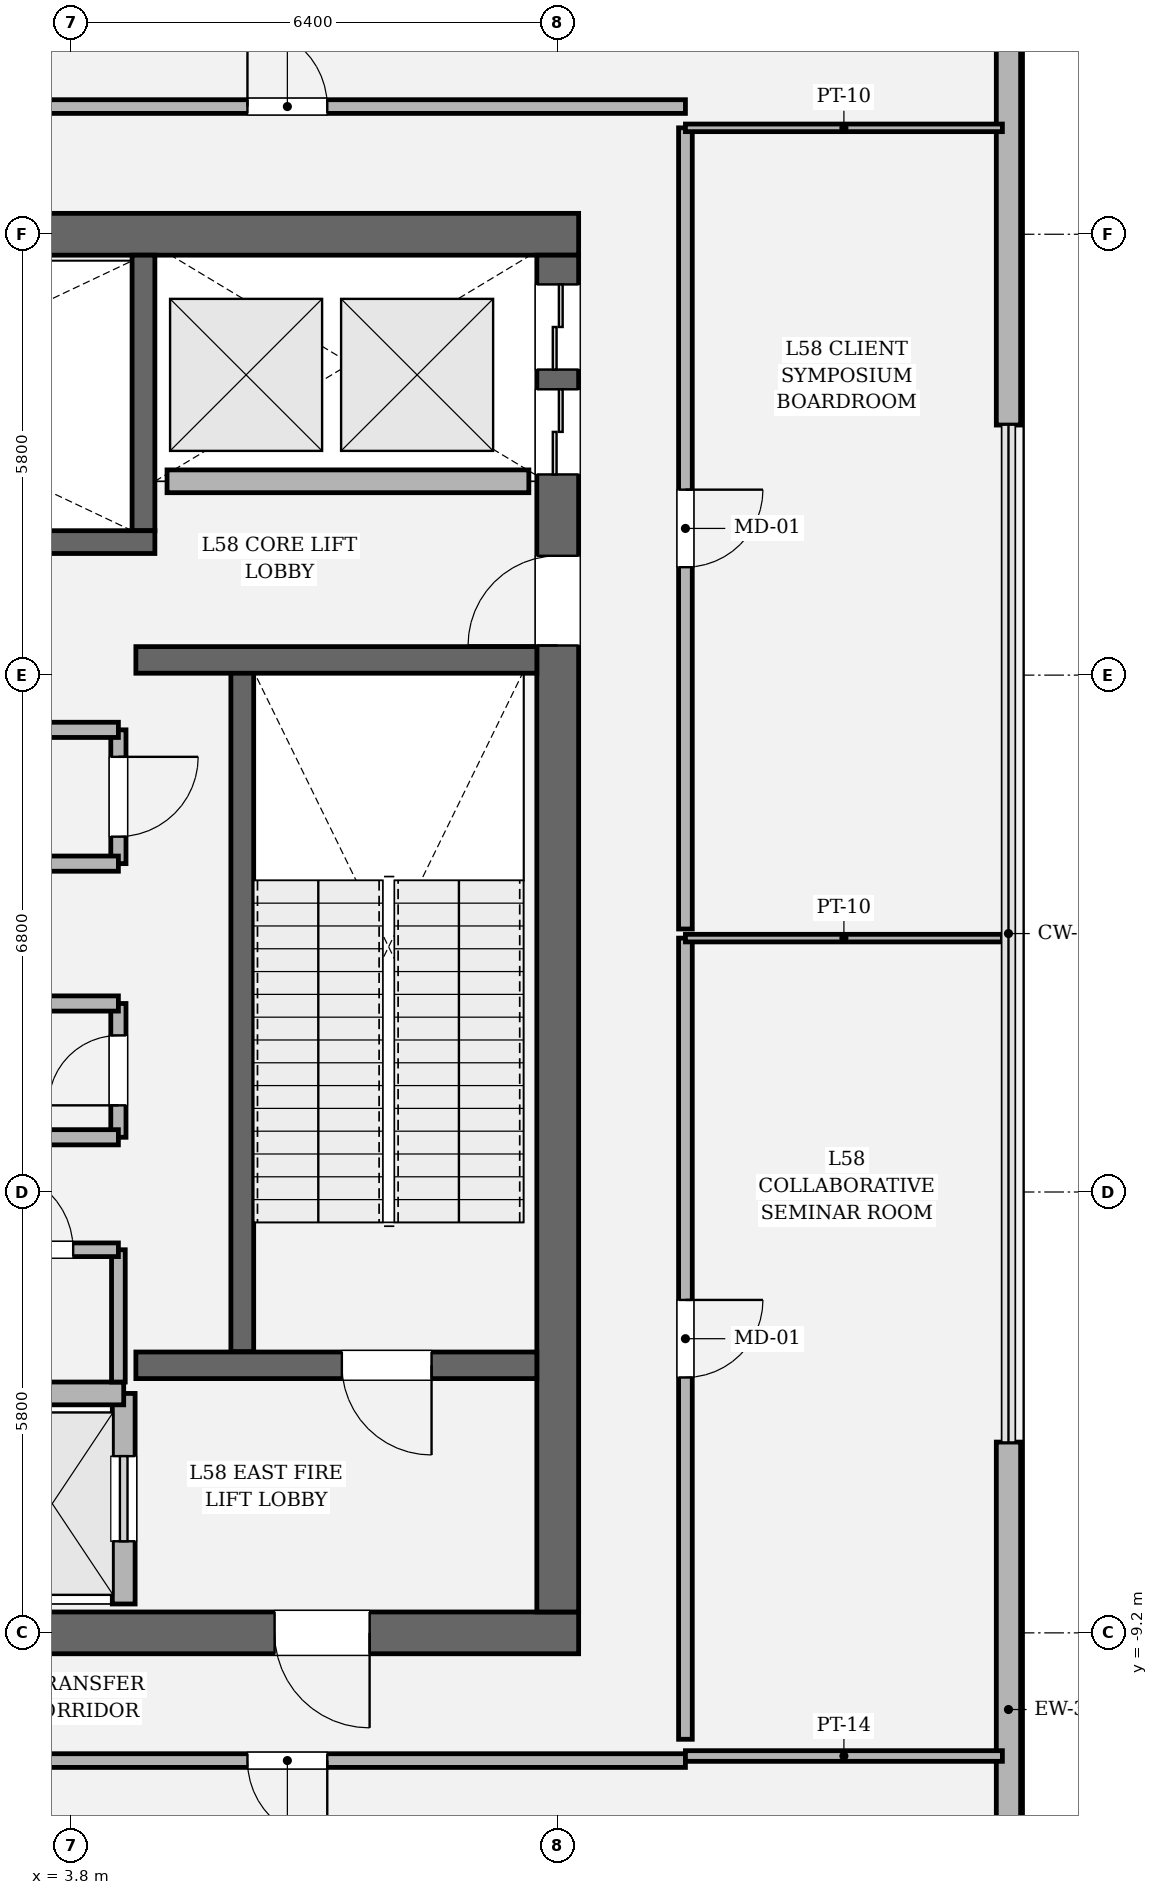
"""IFC4 building model, lengths in metres.
Left out: names, types, materials, properties, quantities, classifications, styles, units other than length and angle.
Written with IfcOpenShell. Run it as: python <this file> out.ifc"""

import sys

from ifc_helpers import new_model, si_unit, direction, frame, frame_2d, origin, place, context, subcontext, project, spatial, rectangle, extrude, element, fill, save


model = new_model("IFC4")
c1 = context("Model", 3, precision=1e-05, world=origin(), true_north=direction((0.0, 1.0)))
c2 = subcontext(c1, "Body", "Model", "MODEL_VIEW")
j1 = project(units=[si_unit("LENGTHUNIT", "METRE"), si_unit("PLANEANGLEUNIT", "RADIAN")], contexts=[c1])
p1 = place(None, origin())
s1 = spatial("IfcSite", under=j1, at=p1, CompositionType="ELEMENT")
p2 = place(p1, origin())
s2 = spatial("IfcBuilding", under=s1, at=p2, CompositionType="ELEMENT")
p3 = place(p2, frame((0.0, 0.0, 246.6)))
s3 = spatial("IfcBuildingStorey", under=s2, at=p3, CompositionType="ELEMENT", Elevation=246.6)
p4 = place(p3, frame((10.475, -9.2, 0.0), z_axis=(0.0, 0.0, 1.0), x_axis=(-1.0, 0.0, 0.0)))
e1 = element("IfcWall", 1, at=p4, inside=s3, PredefinedType="SHEAR", context=c2, shape_type="SweptSolid", body=[
    extrude(rectangle(XDim=20.95, YDim=0.55, at=frame_2d((10.475, 0.0))), origin(), (0.0, 0.0, 1.0), 4.8),
])
p5 = place(p4, frame((2.75, 0.0, 0.0)))
e2 = element("IfcOpeningElement", 2, at=p5, cuts=e1, PredefinedType="OPENING", context=c2, shape_type="SweptSolid", body=[
    extrude(rectangle(XDim=1.25, YDim=2.25, at=frame_2d((0.625, 1.125))), frame((0.0, 0.285, 0.0), z_axis=(0.0, -1.0, 0.0), x_axis=(1.0, 0.0, 0.0)), (0.0, 0.0, 1.0), 0.57),
])
p6 = place(p4, frame((16.95, 0.0, 0.0)))
e3 = element("IfcOpeningElement", 3, at=p6, cuts=e1, PredefinedType="OPENING", context=c2, shape_type="SweptSolid", body=[
    extrude(rectangle(XDim=1.25, YDim=2.25, at=frame_2d((0.625, 1.125))), frame((0.0, 0.285, 0.0), z_axis=(0.0, -1.0, 0.0), x_axis=(1.0, 0.0, 0.0)), (0.0, 0.0, 1.0), 0.57),
])
p7 = place(p3, frame((-10.475, 9.2, 0.0), z_axis=(0.0, 0.0, 1.0), x_axis=(1.0, 0.0, 0.0)))
e4 = element("IfcWall", 4, at=p7, inside=s3, PredefinedType="SHEAR", context=c2, shape_type="SweptSolid", body=[
    extrude(rectangle(XDim=20.95, YDim=0.55, at=frame_2d((10.475, 0.0))), origin(), (0.0, 0.0, 1.0), 4.8),
])
p8 = place(p3, frame((10.2, 8.925, 0.0), z_axis=(0.0, 0.0, 1.0), x_axis=(0.0, -1.0, 0.0)))
e5 = element("IfcWall", 5, at=p8, inside=s3, PredefinedType="SHEAR", context=c2, shape_type="SweptSolid", body=[
    extrude(rectangle(XDim=17.85, YDim=0.55, at=frame_2d((8.925, 0.0))), origin(), (0.0, 0.0, 1.0), 4.8),
])
p9 = place(p8, frame((3.955, 0.0, 0.0)))
e6 = element("IfcOpeningElement", 6, at=p9, cuts=e5, PredefinedType="OPENING", context=c2, shape_type="SweptSolid", body=[
    extrude(rectangle(XDim=1.18, YDim=2.2, at=frame_2d((0.59, 1.1))), frame((0.0, 0.285, 0.0), z_axis=(0.0, -1.0, 0.0), x_axis=(1.0, 0.0, 0.0)), (0.0, 0.0, 1.0), 0.57),
])
p10 = place(p8, frame((1.765, 0.0, 0.0)))
e7 = element("IfcOpeningElement", 7, at=p10, cuts=e5, PredefinedType="OPENING", context=c2, shape_type="SweptSolid", body=[
    extrude(rectangle(XDim=1.12, YDim=2.25, at=frame_2d((0.56, 1.125))), frame((0.0, 0.285, 0.0), z_axis=(0.0, -1.0, 0.0), x_axis=(1.0, 0.0, 0.0)), (0.0, 0.0, 1.0), 0.57),
])
p11 = place(p8, frame((0.385, 0.0, 0.0)))
e8 = element("IfcOpeningElement", 8, at=p11, cuts=e5, PredefinedType="OPENING", context=c2, shape_type="SweptSolid", body=[
    extrude(rectangle(XDim=1.12, YDim=2.25, at=frame_2d((0.56, 1.125))), frame((0.0, 0.285, 0.0), z_axis=(0.0, -1.0, 0.0), x_axis=(1.0, 0.0, 0.0)), (0.0, 0.0, 1.0), 0.57),
])
p12 = place(p3, frame((6.05, 3.45, 0.0), z_axis=(0.0, 0.0, 1.0), x_axis=(0.0, -1.0, 0.0)))
e9 = element("IfcWall", 9, at=p12, inside=s3, PredefinedType="SOLIDWALL", context=c2, shape_type="SweptSolid", body=[
    extrude(rectangle(XDim=8.95, YDim=0.3, at=frame_2d((4.475, 0.0))), origin(), (0.0, 0.0, 1.0), 4.8),
])
p13 = place(p3, frame((4.75, 8.925, 0.0), z_axis=(0.0, 0.0, 1.0), x_axis=(0.0, -1.0, 0.0)))
e10 = element("IfcWall", 10, at=p13, inside=s3, PredefinedType="SOLIDWALL", context=c2, shape_type="SweptSolid", body=[
    extrude(rectangle(XDim=3.625, YDim=0.3, at=frame_2d((1.812, 0.0))), origin(), (0.0, 0.0, 1.0), 4.8),
])
p14 = place(p3, frame((-4.9, 5.15, 0.0), z_axis=(0.0, 0.0, 1.0), x_axis=(1.0, 0.0, 0.0)))
e11 = element("IfcWall", 11, at=p14, inside=s3, PredefinedType="SOLIDWALL", context=c2, shape_type="SweptSolid", body=[
    extrude(rectangle(XDim=9.8, YDim=0.3, at=frame_2d((4.9, 0.0))), origin(), (0.0, 0.0, 1.0), 4.8),
])
p15 = place(p14, frame((0.56, 0.0, 0.0)))
e12 = element("IfcOpeningElement", 12, at=p15, cuts=e11, PredefinedType="OPENING", context=c2, shape_type="SweptSolid", body=[
    extrude(rectangle(XDim=1.18, YDim=2.2, at=frame_2d((0.59, 1.1))), frame((0.0, 0.16, 0.0), z_axis=(0.0, -1.0, 0.0), x_axis=(1.0, 0.0, 0.0)), (0.0, 0.0, 1.0), 0.32),
])
p16 = place(p3, frame((4.65, -5.68, 0.0), z_axis=(0.0, 0.0, 1.0), x_axis=(1.0, 0.0, 0.0)))
e13 = element("IfcWall", 13, at=p16, inside=s3, PredefinedType="SOLIDWALL", context=c2, shape_type="SweptSolid", body=[
    extrude(rectangle(XDim=5.275, YDim=0.35, at=frame_2d((2.638, 0.0))), origin(), (0.0, 0.0, 1.0), 4.8),
])
p17 = place(p16, frame((2.71, 0.0, 0.0)))
e14 = element("IfcOpeningElement", 14, at=p17, cuts=e13, PredefinedType="OPENING", context=c2, shape_type="SweptSolid", body=[
    extrude(rectangle(XDim=1.18, YDim=2.2, at=frame_2d((0.59, 1.1))), frame((0.0, 0.185, 0.0), z_axis=(0.0, -1.0, 0.0), x_axis=(1.0, 0.0, 0.0)), (0.0, 0.0, 1.0), 0.37),
])
p18 = place(p3, frame((4.65, 3.6, 0.0), z_axis=(0.0, 0.0, 1.0), x_axis=(1.0, 0.0, 0.0)))
e15 = element("IfcWall", 15, at=p18, inside=s3, PredefinedType="SOLIDWALL", context=c2, shape_type="SweptSolid", body=[
    extrude(rectangle(XDim=5.275, YDim=0.35, at=frame_2d((2.638, 0.0))), origin(), (0.0, 0.0, 1.0), 4.8),
])
for number, where, z_axis, x_axis in (
    (16, (16.13, -13.727, 0.0), (0.0, 0.0, 1.0), (0.0, 1.0, 0.0)),
    (17, (16.13, 6.69, 0.0), (0.0, 0.0, 1.0), (0.0, 1.0, 0.0)),
):
    element("IfcWall", number, at=place(p3, frame(where, z_axis=z_axis, x_axis=x_axis)), inside=s3, PredefinedType="SOLIDWALL", context=c2, shape_type="SweptSolid", body=[
        extrude(rectangle(XDim=7.037, YDim=0.32, at=frame_2d((3.519, 0.0))), origin(), (0.0, 0.0, 1.0), 3.194),
    ])
p19 = place(p3, frame((4.49, -8.82, 0.0), z_axis=(0.0, 0.0, 1.0), x_axis=(0.0, 1.0, 0.0)))
e18 = element("IfcWall", 18, at=p19, inside=s3, PredefinedType="SOLIDWALL", context=c2, shape_type="SweptSolid", body=[
    extrude(rectangle(XDim=2.77, YDim=0.3, at=frame_2d((1.385, 0.0))), origin(), (0.0, 0.0, 1.0), 4.52),
])
p20 = place(p19, frame((0.825, 0.0, 0.0)))
e19 = element("IfcOpeningElement", 19, at=p20, cuts=e18, PredefinedType="OPENING", context=c2, shape_type="SweptSolid", body=[
    extrude(rectangle(XDim=1.12, YDim=2.25, at=frame_2d((0.56, 1.125))), frame((0.0, 0.16, 0.0), z_axis=(0.0, -1.0, 0.0), x_axis=(1.0, 0.0, 0.0)), (0.0, 0.0, 1.0), 0.32),
])
p21 = place(p3, frame((2.61, -6.05, 0.0), z_axis=(0.0, 0.0, 1.0), x_axis=(1.0, 0.0, 0.0)))
e20 = element("IfcWall", 20, at=p21, inside=s3, PredefinedType="SOLIDWALL", context=c2, shape_type="SweptSolid", body=[
    extrude(rectangle(XDim=1.88, YDim=0.3, at=frame_2d((0.94, 0.0))), origin(), (0.0, 0.0, 1.0), 4.52),
])
p22 = place(p3, frame((5.06, 5.95, 0.0), z_axis=(0.0, 0.0, 1.0), x_axis=(1.0, 0.0, 0.0)))
e21 = element("IfcWall", 21, at=p22, inside=s3, PredefinedType="SOLIDWALL", context=c2, shape_type="SweptSolid", body=[
    extrude(rectangle(XDim=4.76, YDim=0.3, at=frame_2d((2.38, 0.0))), origin(), (0.0, 0.0, 1.0), 4.52),
])
p23 = place(p3, frame((4.42, -5.9, 0.0), z_axis=(0.0, 0.0, 1.0), x_axis=(0.0, 1.0, 0.0)))
e22 = element("IfcWall", 22, at=p23, inside=s3, PredefinedType="PARTITIONING", context=c2, shape_type="SweptSolid", body=[
    extrude(rectangle(XDim=1.74, YDim=0.18, at=frame_2d((0.87, 0.0))), origin(), (0.0, 0.0, 1.0), 4.52),
])
p24 = place(p3, frame((4.42, -4.16, 0.0), z_axis=(0.0, 0.0, 1.0), x_axis=(-1.0, 0.0, 0.0)))
e23 = element("IfcWall", 23, at=p24, inside=s3, PredefinedType="PARTITIONING", context=c2, shape_type="SweptSolid", body=[
    extrude(rectangle(XDim=2.24, YDim=0.18, at=frame_2d((1.12, 0.0))), origin(), (0.0, 0.0, 1.0), 4.52),
])
p25 = place(p24, frame((0.595, 0.0, 0.0)))
e24 = element("IfcOpeningElement", 24, at=p25, cuts=e23, PredefinedType="OPENING", context=c2, shape_type="SweptSolid", body=[
    extrude(rectangle(XDim=1.05, YDim=2.2, at=frame_2d((0.525, 1.1))), frame((0.0, 0.1, 0.0), z_axis=(0.0, -1.0, 0.0), x_axis=(1.0, 0.0, 0.0)), (0.0, 0.0, 1.0), 0.2),
])
p26 = place(p3, frame((4.42, -2.68, 0.0), z_axis=(0.0, 0.0, 1.0), x_axis=(0.0, 1.0, 0.0)))
e25 = element("IfcWall", 25, at=p26, inside=s3, PredefinedType="SOLIDWALL", context=c2, shape_type="SweptSolid", body=[
    extrude(rectangle(XDim=1.76, YDim=0.2, at=frame_2d((0.88, 0.0))), origin(), (0.0, 0.0, 1.0), 4.52),
])
p27 = place(p26, frame((0.42, 0.0, 0.0)))
e26 = element("IfcOpeningElement", 26, at=p27, cuts=e25, PredefinedType="OPENING", context=c2, shape_type="SweptSolid", body=[
    extrude(rectangle(XDim=0.92, YDim=2.1, at=frame_2d((0.46, 1.05))), frame((0.0, 0.11, 0.0), z_axis=(0.0, -1.0, 0.0), x_axis=(1.0, 0.0, 0.0)), (0.0, 0.0, 1.0), 0.22),
])
for number, where, z_axis, x_axis in (
    (27, (4.42, -0.92, 0.0), (0.0, 0.0, 1.0), (-1.0, 0.0, 0.0)),
    (28, (2.48, -2.68, 0.0), (0.0, 0.0, 1.0), (1.0, 0.0, 0.0)),
):
    element("IfcWall", number, at=place(p3, frame(where, z_axis=z_axis, x_axis=x_axis)), inside=s3, PredefinedType="SOLIDWALL", context=c2, shape_type="SweptSolid", body=[
        extrude(rectangle(XDim=1.94, YDim=0.2, at=frame_2d((0.97, 0.0))), origin(), (0.0, 0.0, 1.0), 4.52),
    ])
p28 = place(p3, frame((4.42, 0.92, 0.0), z_axis=(0.0, 0.0, 1.0), x_axis=(0.0, 1.0, 0.0)))
e29 = element("IfcWall", 29, at=p28, inside=s3, PredefinedType="SOLIDWALL", context=c2, shape_type="SweptSolid", body=[
    extrude(rectangle(XDim=1.76, YDim=0.2, at=frame_2d((0.88, 0.0))), origin(), (0.0, 0.0, 1.0), 4.52),
])
p29 = place(p28, frame((0.355, 0.0, 0.0)))
e30 = element("IfcOpeningElement", 30, at=p29, cuts=e29, PredefinedType="OPENING", context=c2, shape_type="SweptSolid", body=[
    extrude(rectangle(XDim=1.05, YDim=2.2, at=frame_2d((0.525, 1.1))), frame((0.0, 0.11, 0.0), z_axis=(0.0, -1.0, 0.0), x_axis=(1.0, 0.0, 0.0)), (0.0, 0.0, 1.0), 0.22),
])
for number, where, z_axis, x_axis in (
    (31, (4.42, 2.68, 0.0), (0.0, 0.0, 1.0), (-1.0, 0.0, 0.0)),
    (32, (2.5, 0.92, 0.0), (0.0, 0.0, 1.0), (1.0, 0.0, 0.0)),
):
    element("IfcWall", number, at=place(p3, frame(where, z_axis=z_axis, x_axis=x_axis)), inside=s3, PredefinedType="SOLIDWALL", context=c2, shape_type="SweptSolid", body=[
        extrude(rectangle(XDim=1.92, YDim=0.2, at=frame_2d((0.96, 0.0))), origin(), (0.0, 0.0, 1.0), 4.52),
    ])
p30 = place(p3, frame((1.406, -10.88, 0.0), z_axis=(0.0, 0.0, 1.0), x_axis=(1.0, 0.0, 0.0)))
e33 = element("IfcWall", 33, at=p30, inside=s3, PredefinedType="PARTITIONING", context=c2, shape_type="SweptSolid", body=[
    extrude(rectangle(XDim=10.474, YDim=0.18, at=frame_2d((5.237, 0.0))), origin(), (0.0, 0.0, 1.0), 3.194),
])
p31 = place(p30, frame((4.712, 0.0, 0.0)))
e34 = element("IfcOpeningElement", 34, at=p31, cuts=e33, PredefinedType="OPENING", context=c2, shape_type="SweptSolid", body=[
    extrude(rectangle(XDim=1.05, YDim=2.2, at=frame_2d((0.525, 1.1))), frame((0.0, 0.1, 0.0), z_axis=(0.0, -1.0, 0.0), x_axis=(1.0, 0.0, 0.0)), (0.0, 0.0, 1.0), 0.2),
])
p32 = place(p3, frame((11.88, -10.82, 0.0), z_axis=(0.0, 0.0, 1.0), x_axis=(1.0, 0.0, 0.0)))
e35 = element("IfcWall", 35, at=p32, inside=s3, PredefinedType="PARTITIONING", context=c2, shape_type="SweptSolid", body=[
    extrude(rectangle(XDim=4.17, YDim=0.14, at=frame_2d((2.085, 0.0))), origin(), (0.0, 0.0, 1.0), 4.154),
])
p33 = place(p3, frame((11.88, -10.6, 0.0), z_axis=(0.0, 0.0, 1.0), x_axis=(0.0, 1.0, 0.0)))
e36 = element("IfcWall", 36, at=p33, inside=s3, PredefinedType="PARTITIONING", context=c2, shape_type="SweptSolid", body=[
    extrude(rectangle(XDim=10.54, YDim=0.18, at=frame_2d((5.27, 0.0))), origin(), (0.0, 0.0, 1.0), 3.194),
])
p34 = place(p33, frame((4.76, 0.0, 0.0)))
e37 = element("IfcOpeningElement", 37, at=p34, cuts=e36, PredefinedType="OPENING", context=c2, shape_type="SweptSolid", body=[
    extrude(rectangle(XDim=1.02, YDim=2.2, at=frame_2d((0.51, 1.1))), frame((0.0, 0.1, 0.0), z_axis=(0.0, -1.0, 0.0), x_axis=(1.0, 0.0, 0.0)), (0.0, 0.0, 1.0), 0.2),
])
p35 = place(p3, frame((11.88, -0.06, 0.0), z_axis=(0.0, 0.0, 1.0), x_axis=(1.0, 0.0, 0.0)))
e38 = element("IfcWall", 38, at=p35, inside=s3, PredefinedType="PARTITIONING", context=c2, shape_type="SweptSolid", body=[
    extrude(rectangle(XDim=4.17, YDim=0.1, at=frame_2d((2.085, 0.0))), origin(), (0.0, 0.0, 1.0), 4.52),
])
p36 = place(p3, frame((11.88, 0.06, 0.0), z_axis=(0.0, 0.0, 1.0), x_axis=(0.0, 1.0, 0.0)))
e39 = element("IfcWall", 39, at=p36, inside=s3, PredefinedType="PARTITIONING", context=c2, shape_type="SweptSolid", body=[
    extrude(rectangle(XDim=10.54, YDim=0.18, at=frame_2d((5.27, 0.0))), origin(), (0.0, 0.0, 1.0), 3.194),
])
p37 = place(p36, frame((4.76, 0.0, 0.0)))
e40 = element("IfcOpeningElement", 40, at=p37, cuts=e39, PredefinedType="OPENING", context=c2, shape_type="SweptSolid", body=[
    extrude(rectangle(XDim=1.02, YDim=2.2, at=frame_2d((0.51, 1.1))), frame((0.0, 0.1, 0.0), z_axis=(0.0, -1.0, 0.0), x_axis=(1.0, 0.0, 0.0)), (0.0, 0.0, 1.0), 0.2),
])
p38 = place(p3, frame((11.88, 10.6, 0.0), z_axis=(0.0, 0.0, 1.0), x_axis=(1.0, 0.0, 0.0)))
e41 = element("IfcWall", 41, at=p38, inside=s3, PredefinedType="PARTITIONING", context=c2, shape_type="SweptSolid", body=[
    extrude(rectangle(XDim=4.17, YDim=0.1, at=frame_2d((2.085, 0.0))), origin(), (0.0, 0.0, 1.0), 4.154),
])
p39 = place(p3, frame((11.88, 10.88, 0.0), z_axis=(0.0, 0.0, 1.0), x_axis=(-1.0, 0.0, 0.0)))
e42 = element("IfcWall", 42, at=p39, inside=s3, PredefinedType="PARTITIONING", context=c2, shape_type="SweptSolid", body=[
    extrude(rectangle(XDim=10.474, YDim=0.18, at=frame_2d((5.237, 0.0))), origin(), (0.0, 0.0, 1.0), 3.194),
])
p40 = place(p39, frame((4.712, 0.0, 0.0)))
e43 = element("IfcOpeningElement", 43, at=p40, cuts=e42, PredefinedType="OPENING", context=c2, shape_type="SweptSolid", body=[
    extrude(rectangle(XDim=1.05, YDim=2.2, at=frame_2d((0.525, 1.1))), frame((0.0, 0.1, 0.0), z_axis=(0.0, -1.0, 0.0), x_axis=(1.0, 0.0, 0.0)), (0.0, 0.0, 1.0), 0.2),
])
p41 = place(p17, origin())
e44 = element("IfcDoor", 44, at=p41, inside=s3, OperationType="SINGLE_SWING_RIGHT", PredefinedType="DOOR", context=c2, shape_type="SweptSolid", body=[
    extrude(rectangle(XDim=1.18, YDim=2.2, at=frame_2d((0.59, 1.1))), frame((0.0, 0.025, 0.0), z_axis=(0.0, -1.0, 0.0), x_axis=(1.0, 0.0, 0.0)), (0.0, 0.0, 1.0), 0.05),
])
fill(e14, e44)
p42 = place(p5, origin())
e45 = element("IfcDoor", 45, at=p42, inside=s3, OperationType="SINGLE_SWING_LEFT", PredefinedType="DOOR", context=c2, shape_type="SweptSolid", body=[
    extrude(rectangle(XDim=1.25, YDim=2.25, at=frame_2d((0.625, 1.125))), frame((0.0, 0.025, 0.0), z_axis=(0.0, -1.0, 0.0), x_axis=(1.0, 0.0, 0.0)), (0.0, 0.0, 1.0), 0.05),
])
fill(e2, e45)
p43 = place(p9, origin())
e46 = element("IfcDoor", 46, at=p43, inside=s3, OperationType="SINGLE_SWING_RIGHT", PredefinedType="DOOR", context=c2, shape_type="SweptSolid", body=[
    extrude(rectangle(XDim=1.18, YDim=2.2, at=frame_2d((0.59, 1.1))), frame((0.0, 0.025, 0.0), z_axis=(0.0, -1.0, 0.0), x_axis=(1.0, 0.0, 0.0)), (0.0, 0.0, 1.0), 0.05),
])
fill(e6, e46)
p44 = place(p20, origin())
e47 = element("IfcDoor", 47, at=p44, inside=s3, OperationType="SLIDING_TO_RIGHT", PredefinedType="DOOR", context=c2, shape_type="SweptSolid", body=[
    extrude(rectangle(XDim=1.12, YDim=2.25, at=frame_2d((0.56, 1.125))), frame((0.0, 0.025, 0.0), z_axis=(0.0, -1.0, 0.0), x_axis=(1.0, 0.0, 0.0)), (0.0, 0.0, 1.0), 0.05),
])
fill(e19, e47)
p45 = place(p10, origin())
e48 = element("IfcDoor", 48, at=p45, inside=s3, OperationType="DOUBLE_DOOR_SLIDING", PredefinedType="DOOR", context=c2, shape_type="SweptSolid", body=[
    extrude(rectangle(XDim=1.12, YDim=2.25, at=frame_2d((0.56, 1.125))), frame((0.0, 0.025, 0.0), z_axis=(0.0, -1.0, 0.0), x_axis=(1.0, 0.0, 0.0)), (0.0, 0.0, 1.0), 0.05),
])
fill(e7, e48)
p46 = place(p11, origin())
e49 = element("IfcDoor", 49, at=p46, inside=s3, OperationType="DOUBLE_DOOR_SLIDING", PredefinedType="DOOR", context=c2, shape_type="SweptSolid", body=[
    extrude(rectangle(XDim=1.12, YDim=2.25, at=frame_2d((0.56, 1.125))), frame((0.0, 0.025, 0.0), z_axis=(0.0, -1.0, 0.0), x_axis=(1.0, 0.0, 0.0)), (0.0, 0.0, 1.0), 0.05),
])
fill(e8, e49)
p47 = place(p25, origin())
e50 = element("IfcDoor", 50, at=p47, inside=s3, OperationType="SINGLE_SWING_RIGHT", PredefinedType="DOOR", context=c2, shape_type="SweptSolid", body=[
    extrude(rectangle(XDim=1.05, YDim=2.2, at=frame_2d((0.525, 1.1))), frame((0.0, 0.025, 0.0), z_axis=(0.0, -1.0, 0.0), x_axis=(1.0, 0.0, 0.0)), (0.0, 0.0, 1.0), 0.05),
])
fill(e24, e50)
p48 = place(p27, origin())
e51 = element("IfcDoor", 51, at=p48, inside=s3, OperationType="SINGLE_SWING_LEFT", PredefinedType="DOOR", context=c2, shape_type="SweptSolid", body=[
    extrude(rectangle(XDim=0.92, YDim=2.1, at=frame_2d((0.46, 1.05))), frame((0.0, 0.025, 0.0), z_axis=(0.0, -1.0, 0.0), x_axis=(1.0, 0.0, 0.0)), (0.0, 0.0, 1.0), 0.05),
])
fill(e26, e51)
p49 = place(p29, origin())
e52 = element("IfcDoor", 52, at=p49, inside=s3, OperationType="SINGLE_SWING_RIGHT", PredefinedType="DOOR", context=c2, shape_type="SweptSolid", body=[
    extrude(rectangle(XDim=1.05, YDim=2.2, at=frame_2d((0.525, 1.1))), frame((0.0, 0.025, 0.0), z_axis=(0.0, -1.0, 0.0), x_axis=(1.0, 0.0, 0.0)), (0.0, 0.0, 1.0), 0.05),
])
fill(e30, e52)
p50 = place(p31, origin())
e53 = element("IfcDoor", 53, at=p50, inside=s3, OperationType="SINGLE_SWING_RIGHT", PredefinedType="DOOR", context=c2, shape_type="SweptSolid", body=[
    extrude(rectangle(XDim=1.05, YDim=2.2, at=frame_2d((0.525, 1.1))), frame((0.0, 0.025, 0.0), z_axis=(0.0, -1.0, 0.0), x_axis=(1.0, 0.0, 0.0)), (0.0, 0.0, 1.0), 0.05),
])
fill(e34, e53)
p51 = place(p34, origin())
e54 = element("IfcDoor", 54, at=p51, inside=s3, OperationType="SINGLE_SWING_RIGHT", PredefinedType="DOOR", context=c2, shape_type="SweptSolid", body=[
    extrude(rectangle(XDim=1.02, YDim=2.2, at=frame_2d((0.51, 1.1))), frame((0.0, 0.025, 0.0), z_axis=(0.0, -1.0, 0.0), x_axis=(1.0, 0.0, 0.0)), (0.0, 0.0, 1.0), 0.05),
])
fill(e37, e54)
p52 = place(p37, origin())
e55 = element("IfcDoor", 55, at=p52, inside=s3, OperationType="SINGLE_SWING_RIGHT", PredefinedType="DOOR", context=c2, shape_type="SweptSolid", body=[
    extrude(rectangle(XDim=1.02, YDim=2.2, at=frame_2d((0.51, 1.1))), frame((0.0, 0.025, 0.0), z_axis=(0.0, -1.0, 0.0), x_axis=(1.0, 0.0, 0.0)), (0.0, 0.0, 1.0), 0.05),
])
fill(e40, e55)
p53 = place(p40, origin())
e56 = element("IfcDoor", 56, at=p53, inside=s3, OperationType="SINGLE_SWING_RIGHT", PredefinedType="DOOR", context=c2, shape_type="SweptSolid", body=[
    extrude(rectangle(XDim=1.05, YDim=2.2, at=frame_2d((0.525, 1.1))), frame((0.0, 0.025, 0.0), z_axis=(0.0, -1.0, 0.0), x_axis=(1.0, 0.0, 0.0)), (0.0, 0.0, 1.0), 0.05),
])
fill(e43, e56)
save(model, sys.argv[1])
